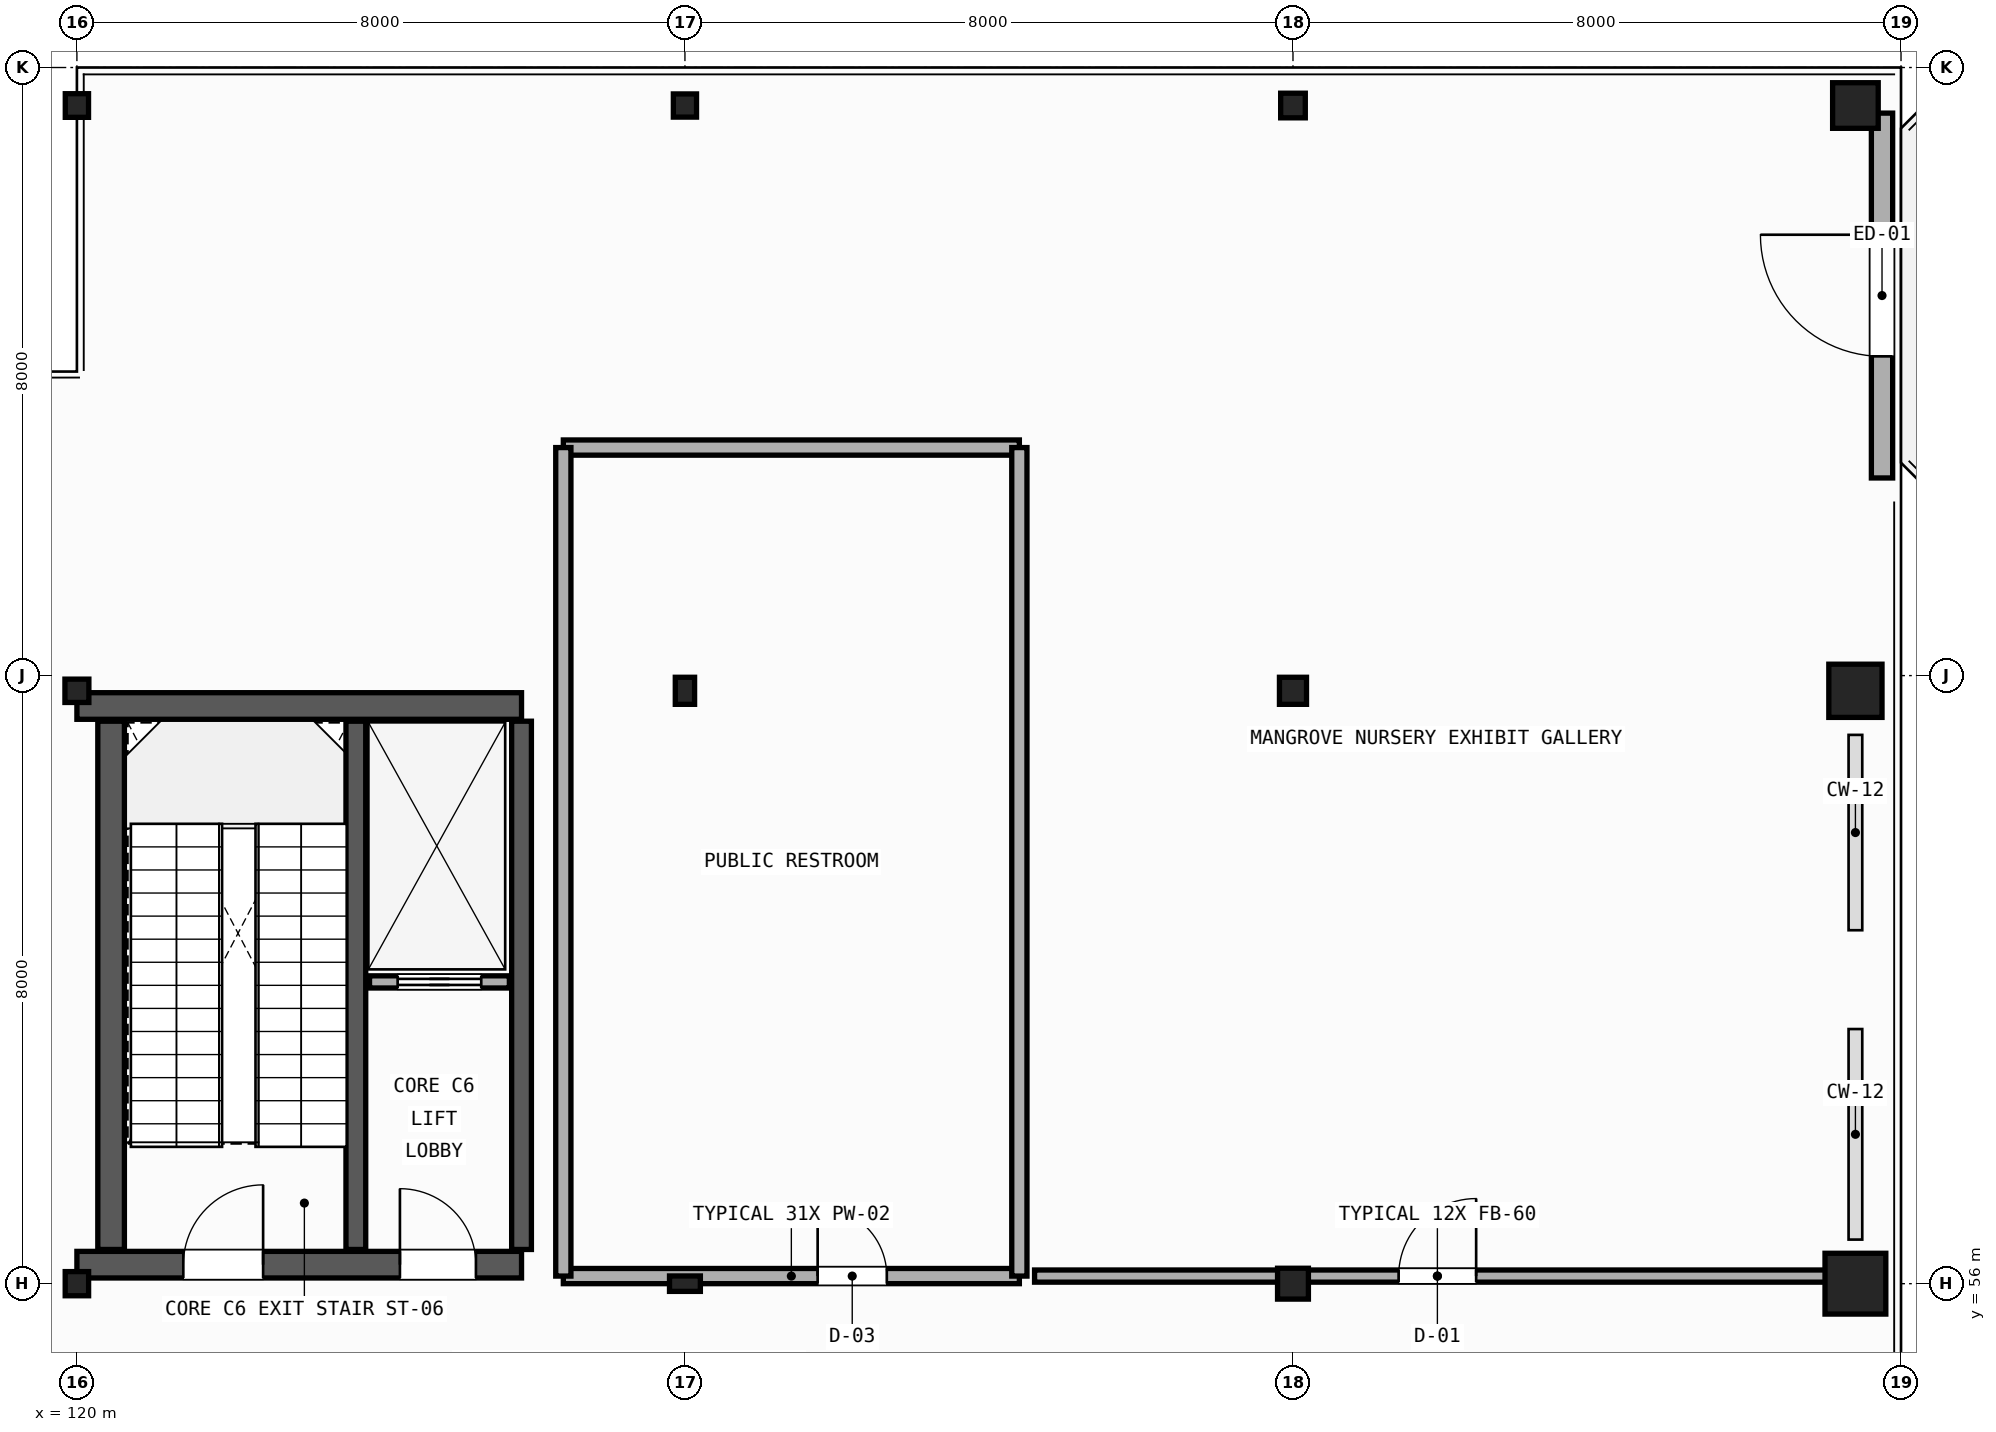
"""IFC4 building model, lengths in metres.
Left out: names, types, materials, properties, quantities, classifications, styles, units other than length and angle.
Written with IfcOpenShell. Run it as: python <this file> out.ifc"""

import sys

from ifc_helpers import new_model, si_unit, direction, frame, frame_2d, origin, origin_2d, place, context, subcontext, project, spatial, rectangle, hollow_rectangle, hollow_circle, i_section, extrude, element, fill, save


model = new_model("IFC4")
c1 = context("Model", 3, precision=1e-05, world=origin(), true_north=direction((0.0, 1.0)))
c2 = subcontext(c1, "Body", "Model", "MODEL_VIEW")
j1 = project(units=[si_unit("LENGTHUNIT", "METRE"), si_unit("PLANEANGLEUNIT", "RADIAN")], contexts=[c1])
p1 = place(None, origin())
s1 = spatial("IfcSite", under=j1, at=p1, CompositionType="ELEMENT")
p2 = place(p1, origin())
s2 = spatial("IfcBuilding", under=s1, at=p2, CompositionType="ELEMENT")
p3 = place(p2, frame((0.0, 0.0, 5.4)))
s3 = spatial("IfcBuildingStorey", under=s2, at=p3, CompositionType="ELEMENT", Elevation=5.4)
p4 = place(p3, frame((120.0, 56.0, 0.0), z_axis=(0.0, 0.0, 1.0), x_axis=(1.0, 0.0, 0.0)))
e1 = element("IfcColumn", 1, at=p4, inside=s3, PredefinedType="COLUMN", context=c2, shape_type="SweptSolid", body=[
    extrude(i_section(OverallWidth=0.308, OverallDepth=0.318, WebThickness=0.013, FlangeThickness=0.021, FilletRadius=0.013, at=origin_2d()), origin(), (0.0, 0.0, 1.0), 4.56),
])
p5 = place(p3, frame((120.0, 63.8, 0.0), z_axis=(0.0, 0.0, 1.0), x_axis=(0.0, 1.0, 0.0)))
e2 = element("IfcColumn", 2, at=p5, inside=s3, PredefinedType="COLUMN", context=c2, shape_type="SweptSolid", body=[
    extrude(i_section(OverallWidth=0.307, OverallDepth=0.315, WebThickness=0.012, FlangeThickness=0.019, FilletRadius=0.013, at=origin_2d()), origin(), (0.0, 0.0, 1.0), 4.56),
])
p6 = place(p3, frame((120.0, 71.5, 0.0), z_axis=(0.0, 0.0, 1.0), x_axis=(1.0, 0.0, 0.0)))
e3 = element("IfcColumn", 3, at=p6, inside=s3, PredefinedType="COLUMN", context=c2, shape_type="SweptSolid", body=[
    extrude(i_section(OverallWidth=0.306, OverallDepth=0.311, WebThickness=0.011, FlangeThickness=0.017, FilletRadius=0.013, at=origin_2d()), origin(), (0.0, 0.0, 1.0), 4.8),
])
p7 = place(p3, frame((128.0, 56.0, 0.0), z_axis=(0.0, 0.0, 1.0), x_axis=(0.0, 1.0, 0.0)))
e4 = element("IfcColumn", 4, at=p7, inside=s3, PredefinedType="COLUMN", context=c2, shape_type="SweptSolid", body=[
    extrude(hollow_rectangle(XDim=0.203, YDim=0.406, WallThickness=0.012, InnerFilletRadius=0.012, OuterFilletRadius=0.024, at=origin_2d()), origin(), (0.0, 0.0, 1.0), 4.56),
])
p8 = place(p3, frame((128.0, 63.8, 0.0), z_axis=(0.0, 0.0, 1.0), x_axis=(1.0, 0.0, 0.0)))
e5 = element("IfcColumn", 5, at=p8, inside=s3, PredefinedType="COLUMN", context=c2, shape_type="SweptSolid", body=[
    extrude(hollow_rectangle(XDim=0.254, YDim=0.356, WallThickness=0.012, InnerFilletRadius=0.012, OuterFilletRadius=0.024, at=origin_2d()), origin(), (0.0, 0.0, 1.0), 4.56),
])
p9 = place(p3, frame((128.0, 71.5, 0.0), z_axis=(0.0, 0.0, 1.0), x_axis=(0.0, 1.0, 0.0)))
e6 = element("IfcColumn", 6, at=p9, inside=s3, PredefinedType="COLUMN", context=c2, shape_type="SweptSolid", body=[
    extrude(hollow_rectangle(XDim=0.305, YDim=0.305, WallThickness=0.012, InnerFilletRadius=0.012, OuterFilletRadius=0.024, at=origin_2d()), origin(), (0.0, 0.0, 1.0), 4.8),
])
p10 = place(p3, frame((136.0, 56.0, 0.0), z_axis=(0.0, 0.0, 1.0), x_axis=(1.0, 0.0, 0.0)))
e7 = element("IfcColumn", 7, at=p10, inside=s3, PredefinedType="COLUMN", context=c2, shape_type="SweptSolid", body=[
    extrude(hollow_circle(Radius=0.203, WallThickness=0.012, at=origin_2d()), origin(), (0.0, 0.0, 1.0), 4.56),
])
p11 = place(p3, frame((136.0, 63.8, 0.0), z_axis=(0.0, 0.0, 1.0), x_axis=(0.0, 1.0, 0.0)))
e8 = element("IfcColumn", 8, at=p11, inside=s3, PredefinedType="COLUMN", context=c2, shape_type="SweptSolid", body=[
    extrude(hollow_circle(Radius=0.178, WallThickness=0.012, at=origin_2d()), origin(), (0.0, 0.0, 1.0), 4.56),
])
p12 = place(p3, frame((136.0, 71.5, 0.0), z_axis=(0.0, 0.0, 1.0), x_axis=(1.0, 0.0, 0.0)))
e9 = element("IfcColumn", 9, at=p12, inside=s3, PredefinedType="COLUMN", context=c2, shape_type="SweptSolid", body=[
    extrude(hollow_circle(Radius=0.162, WallThickness=0.012, at=origin_2d()), origin(), (0.0, 0.0, 1.0), 4.8),
])
p13 = place(p3, frame((143.4, 56.0, 0.0), z_axis=(0.0, 0.0, 1.0), x_axis=(0.0, 1.0, 0.0)))
e10 = element("IfcColumn", 10, at=p13, inside=s3, PredefinedType="COLUMN", context=c2, shape_type="SweptSolid", body=[
    extrude(rectangle(XDim=0.8, YDim=0.8, at=origin_2d()), origin(), (0.0, 0.0, 1.0), 4.8),
])
p14 = place(p3, frame((143.4, 63.8, 0.0), z_axis=(0.0, 0.0, 1.0), x_axis=(1.0, 0.0, 0.0)))
e11 = element("IfcColumn", 11, at=p14, inside=s3, PredefinedType="COLUMN", context=c2, shape_type="SweptSolid", body=[
    extrude(rectangle(XDim=0.7, YDim=0.7, at=origin_2d()), origin(), (0.0, 0.0, 1.0), 4.8),
])
p15 = place(p3, frame((143.4, 71.5, 0.0), z_axis=(0.0, 0.0, 1.0), x_axis=(0.0, 1.0, 0.0)))
e12 = element("IfcColumn", 12, at=p15, inside=s3, PredefinedType="COLUMN", context=c2, shape_type="SweptSolid", body=[
    extrude(rectangle(XDim=0.6, YDim=0.6, at=origin_2d()), origin(), (0.0, 0.0, 1.0), 4.8),
])
p16 = place(p3, frame((143.75, 66.6, 0.0), z_axis=(0.0, 0.0, 1.0), x_axis=(0.0, 1.0, 0.0)))
e13 = element("IfcWall", 13, at=p16, inside=s3, PredefinedType="STANDARD", context=c2, shape_type="SweptSolid", body=[
    extrude(rectangle(XDim=4.8, YDim=0.28, at=frame_2d((2.4, 0.0))), origin(), (0.0, 0.0, 1.0), 4.2),
])
p17 = place(p16, frame((1.6, 0.0, 0.0)))
e14 = element("IfcOpeningElement", 14, at=p17, cuts=e13, PredefinedType="OPENING", context=c2, shape_type="SweptSolid", body=[
    extrude(rectangle(XDim=1.6, YDim=2.25, at=frame_2d((0.8, 1.125))), frame((0.0, 0.15, 0.0), z_axis=(0.0, -1.0, 0.0), x_axis=(1.0, 0.0, 0.0)), (0.0, 0.0, 1.0), 0.3),
])
p18 = place(p3, frame((120.0, 56.25, 0.0), z_axis=(0.0, 0.0, 1.0), x_axis=(1.0, 0.0, 0.0)))
e15 = element("IfcWall", 15, at=p18, inside=s3, PredefinedType="SHEAR", context=c2, shape_type="SweptSolid", body=[
    extrude(rectangle(XDim=5.85, YDim=0.35, at=frame_2d((2.925, 0.0))), origin(), (0.0, 0.0, 1.0), 4.55),
])
p19 = place(p18, frame((1.4, 0.0, 0.0)))
e16 = element("IfcOpeningElement", 16, at=p19, cuts=e15, PredefinedType="OPENING", context=c2, shape_type="SweptSolid", body=[
    extrude(rectangle(XDim=1.05, YDim=2.1, at=frame_2d((0.525, 1.05))), frame((0.0, 0.185, 0.0), z_axis=(0.0, -1.0, 0.0), x_axis=(1.0, 0.0, 0.0)), (0.0, 0.0, 1.0), 0.37),
])
p20 = place(p18, frame((4.25, 0.0, 0.0)))
e17 = element("IfcOpeningElement", 17, at=p20, cuts=e15, PredefinedType="OPENING", context=c2, shape_type="SweptSolid", body=[
    extrude(rectangle(XDim=1.0, YDim=2.15, at=frame_2d((0.5, 1.075))), frame((0.0, 0.185, 0.0), z_axis=(0.0, -1.0, 0.0), x_axis=(1.0, 0.0, 0.0)), (0.0, 0.0, 1.0), 0.37),
])
p21 = place(p3, frame((120.0, 63.6, 0.0), z_axis=(0.0, 0.0, 1.0), x_axis=(1.0, 0.0, 0.0)))
e18 = element("IfcWall", 18, at=p21, inside=s3, PredefinedType="SHEAR", context=c2, shape_type="SweptSolid", body=[
    extrude(rectangle(XDim=5.85, YDim=0.35, at=frame_2d((2.925, 0.0))), origin(), (0.0, 0.0, 1.0), 4.55),
])
p22 = place(p3, frame((120.45, 56.45, 0.0), z_axis=(0.0, 0.0, 1.0), x_axis=(0.0, 1.0, 0.0)))
e19 = element("IfcWall", 19, at=p22, inside=s3, PredefinedType="SHEAR", context=c2, shape_type="SweptSolid", body=[
    extrude(rectangle(XDim=6.95, YDim=0.35, at=frame_2d((3.475, 0.0))), origin(), (0.0, 0.0, 1.0), 4.55),
])
for number, where, z_axis, x_axis in (
    (20, (125.85, 56.45, 0.0), (0.0, 0.0, 1.0), (0.0, 1.0, 0.0)),
    (21, (123.67, 56.45, 0.0), (0.0, 0.0, 1.0), (0.0, 1.0, 0.0)),
):
    element("IfcWall", number, at=place(p3, frame(where, z_axis=z_axis, x_axis=x_axis)), inside=s3, PredefinedType="SHEAR", context=c2, shape_type="SweptSolid", body=[
        extrude(rectangle(XDim=6.95, YDim=0.26, at=frame_2d((3.475, 0.0))), origin(), (0.0, 0.0, 1.0), 4.55),
    ])
p23 = place(p3, frame((123.85, 59.97, 0.0), z_axis=(0.0, 0.0, 1.0), x_axis=(1.0, 0.0, 0.0)))
e22 = element("IfcWall", 22, at=p23, inside=s3, PredefinedType="PARTITIONING", context=c2, shape_type="SweptSolid", body=[
    extrude(rectangle(XDim=1.84, YDim=0.16, at=frame_2d((0.92, 0.0))), origin(), (0.0, 0.0, 1.0), 3.6),
])
p24 = place(p23, frame((0.37, 0.0, 0.0)))
e23 = element("IfcOpeningElement", 23, at=p24, cuts=e22, PredefinedType="OPENING", context=c2, shape_type="SweptSolid", body=[
    extrude(rectangle(XDim=1.1, YDim=2.15, at=frame_2d((0.55, 1.075))), frame((0.0, 0.09, 0.0), z_axis=(0.0, -1.0, 0.0), x_axis=(1.0, 0.0, 0.0)), (0.0, 0.0, 1.0), 0.18),
])
p25 = place(p3, frame((126.4, 56.1, 0.0), z_axis=(0.0, 0.0, 1.0), x_axis=(1.0, 0.0, 0.0)))
e24 = element("IfcWall", 24, at=p25, inside=s3, PredefinedType="PLUMBINGWALL", context=c2, shape_type="SweptSolid", body=[
    extrude(rectangle(XDim=6.0, YDim=0.2, at=frame_2d((3.0, 0.0))), origin(), (0.0, 0.0, 1.0), 3.758),
])
p26 = place(p25, frame((3.346, 0.0, 0.0)))
e25 = element("IfcOpeningElement", 25, at=p26, cuts=e24, PredefinedType="OPENING", context=c2, shape_type="SweptSolid", body=[
    extrude(rectangle(XDim=0.91, YDim=2.1, at=frame_2d((0.455, 1.05))), frame((0.0, 0.11, 0.0), z_axis=(0.0, -1.0, 0.0), x_axis=(1.0, 0.0, 0.0)), (0.0, 0.0, 1.0), 0.22),
])
p27 = place(p3, frame((126.4, 67.0, 0.0), z_axis=(0.0, 0.0, 1.0), x_axis=(1.0, 0.0, 0.0)))
e26 = element("IfcWall", 26, at=p27, inside=s3, PredefinedType="PLUMBINGWALL", context=c2, shape_type="SweptSolid", body=[
    extrude(rectangle(XDim=6.0, YDim=0.2, at=frame_2d((3.0, 0.0))), origin(), (0.0, 0.0, 1.0), 4.29),
])
p28 = place(p3, frame((126.4, 56.1, 0.0), z_axis=(0.0, 0.0, 1.0), x_axis=(0.0, 1.0, 0.0)))
e27 = element("IfcWall", 27, at=p28, inside=s3, PredefinedType="PLUMBINGWALL", context=c2, shape_type="SweptSolid", body=[
    extrude(rectangle(XDim=10.9, YDim=0.2, at=frame_2d((5.45, 0.0))), origin(), (0.0, 0.0, 1.0), 3.987),
])
p29 = place(p3, frame((132.4, 56.1, 0.0), z_axis=(0.0, 0.0, 1.0), x_axis=(0.0, 1.0, 0.0)))
e28 = element("IfcWall", 28, at=p29, inside=s3, PredefinedType="PLUMBINGWALL", context=c2, shape_type="SweptSolid", body=[
    extrude(rectangle(XDim=10.9, YDim=0.2, at=frame_2d((5.45, 0.0))), origin(), (0.0, 0.0, 1.0), 3.758),
])
p30 = place(p3, frame((132.6, 56.1, 0.0), z_axis=(0.0, 0.0, 1.0), x_axis=(1.0, 0.0, 0.0)))
e29 = element("IfcWall", 29, at=p30, inside=s3, PredefinedType="PARTITIONING", context=c2, shape_type="SweptSolid", body=[
    extrude(rectangle(XDim=10.6, YDim=0.16, at=frame_2d((5.3, 0.0))), origin(), (0.0, 0.0, 1.0), 3.767),
])
p31 = place(p30, frame((4.79, 0.0, 0.0)))
e30 = element("IfcOpeningElement", 30, at=p31, cuts=e29, PredefinedType="OPENING", context=c2, shape_type="SweptSolid", body=[
    extrude(rectangle(XDim=1.02, YDim=2.15, at=frame_2d((0.51, 1.075))), frame((0.0, 0.09, 0.0), z_axis=(0.0, -1.0, 0.0), x_axis=(1.0, 0.0, 0.0)), (0.0, 0.0, 1.0), 0.18),
])
p32 = place(p17, origin())
e31 = element("IfcDoor", 31, at=p32, inside=s3, OperationType="SINGLE_SWING_RIGHT", PredefinedType="DOOR", context=c2, shape_type="SweptSolid", body=[
    extrude(rectangle(XDim=1.6, YDim=2.25, at=frame_2d((0.8, 1.125))), frame((0.0, 0.025, 0.0), z_axis=(0.0, -1.0, 0.0), x_axis=(1.0, 0.0, 0.0)), (0.0, 0.0, 1.0), 0.05),
])
fill(e14, e31)
p33 = place(p24, origin())
e32 = element("IfcDoor", 32, at=p33, inside=s3, OperationType="SLIDING_TO_LEFT", PredefinedType="DOOR", context=c2, shape_type="SweptSolid", body=[
    extrude(rectangle(XDim=1.1, YDim=2.15, at=frame_2d((0.55, 1.075))), frame((0.0, 0.025, 0.0), z_axis=(0.0, -1.0, 0.0), x_axis=(1.0, 0.0, 0.0)), (0.0, 0.0, 1.0), 0.05),
])
fill(e23, e32)
p34 = place(p19, origin())
e33 = element("IfcDoor", 33, at=p34, inside=s3, OperationType="SINGLE_SWING_RIGHT", PredefinedType="DOOR", context=c2, shape_type="SweptSolid", body=[
    extrude(rectangle(XDim=1.05, YDim=2.1, at=frame_2d((0.525, 1.05))), frame((0.0, 0.025, 0.0), z_axis=(0.0, -1.0, 0.0), x_axis=(1.0, 0.0, 0.0)), (0.0, 0.0, 1.0), 0.05),
])
fill(e16, e33)
p35 = place(p20, origin())
e34 = element("IfcDoor", 34, at=p35, inside=s3, OperationType="SINGLE_SWING_LEFT", PredefinedType="DOOR", context=c2, shape_type="SweptSolid", body=[
    extrude(rectangle(XDim=1.0, YDim=2.15, at=frame_2d((0.5, 1.075))), frame((0.0, 0.025, 0.0), z_axis=(0.0, -1.0, 0.0), x_axis=(1.0, 0.0, 0.0)), (0.0, 0.0, 1.0), 0.05),
])
fill(e17, e34)
p36 = place(p26, origin())
e35 = element("IfcDoor", 35, at=p36, inside=s3, OperationType="SINGLE_SWING_LEFT", PredefinedType="DOOR", context=c2, shape_type="SweptSolid", body=[
    extrude(rectangle(XDim=0.91, YDim=2.1, at=frame_2d((0.455, 1.05))), frame((0.0, 0.025, 0.0), z_axis=(0.0, -1.0, 0.0), x_axis=(1.0, 0.0, 0.0)), (0.0, 0.0, 1.0), 0.05),
])
fill(e25, e35)
p37 = place(p31, origin())
e36 = element("IfcDoor", 36, at=p37, inside=s3, OperationType="SINGLE_SWING_RIGHT", PredefinedType="DOOR", context=c2, shape_type="SweptSolid", body=[
    extrude(rectangle(XDim=1.02, YDim=2.15, at=frame_2d((0.51, 1.075))), frame((0.0, 0.025, 0.0), z_axis=(0.0, -1.0, 0.0), x_axis=(1.0, 0.0, 0.0)), (0.0, 0.0, 1.0), 0.05),
])
fill(e30, e36)
save(model, sys.argv[1])
